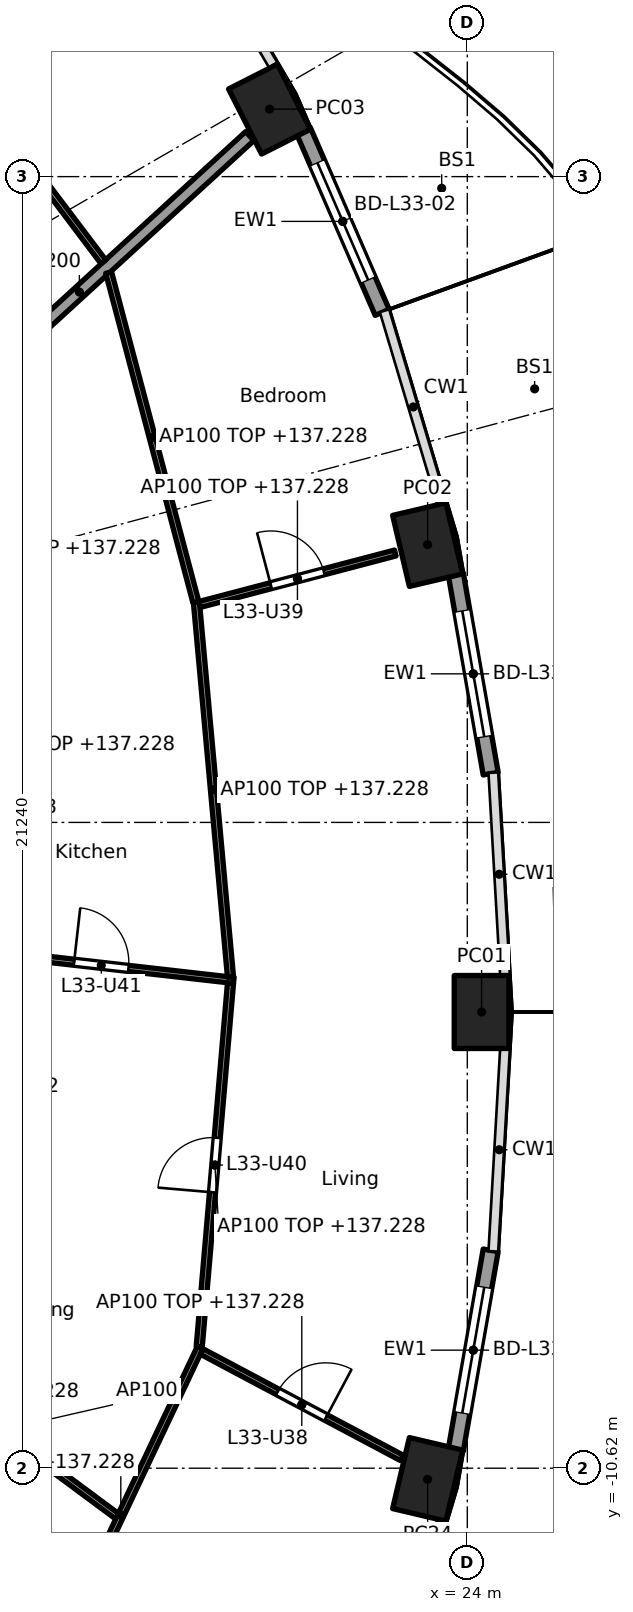
"""IFC4 building model, lengths in metres.
Left out: names, types, materials, properties, quantities, classifications, styles, units other than length and angle.
Written with IfcOpenShell. Run it as: python <this file> out.ifc"""

import sys

from ifc_helpers import new_model, si_unit, direction, frame, frame_2d, origin, origin_2d, place, context, subcontext, project, spatial, rectangle, hollow_rectangle, extrude, element, fill, save


model = new_model("IFC4")
c1 = context("Model", 3, precision=1e-05, world=origin(), true_north=direction((0.0, 1.0)))
c2 = subcontext(c1, "Body", "Model", "MODEL_VIEW")
j1 = project(units=[si_unit("LENGTHUNIT", "METRE"), si_unit("PLANEANGLEUNIT", "RADIAN")], contexts=[c1])
p1 = place(None, origin())
s1 = spatial("IfcSite", under=j1, at=p1, CompositionType="ELEMENT")
p2 = place(p1, origin())
s2 = spatial("IfcBuilding", under=s1, at=p2, CompositionType="ELEMENT")
p3 = place(p2, frame((0.0, 0.0, 134.4)))
s3 = spatial("IfcBuildingStorey", under=s2, at=p3, CompositionType="ELEMENT", Elevation=134.4)
for number, where, z_axis, x_axis in (
    (1, (24.235, -3.118, 0.0), (0.0, 0.0, 1.0), (0.0, 1.0, 0.0)),
    (2, (23.348, 4.568, 0.0), (0.0, 0.0, 1.0), (-0.229, 0.973, 0.0)),
    (3, (20.747, 11.73, 0.0), (0.0, 0.0, 1.0), (-0.452, 0.892, 0.0)),
    (4, (23.348, -10.803, 0.0), (0.0, 0.0, 1.0), (0.229, 0.973, 0.0)),
):
    element("IfcColumn", number, at=place(p3, frame(where, z_axis=z_axis, x_axis=x_axis)), inside=s3, PredefinedType="COLUMN", context=c2, shape_type="SweptSolid", body=[
        extrude(hollow_rectangle(XDim=1.2, YDim=0.9, WallThickness=0.04, at=origin_2d()), origin(), (0.0, 0.0, 1.0), 3.7),
    ])
p4 = place(p3, frame((23.811, 4.085, 0.0), z_axis=(0.0, 0.0, 1.0), x_axis=(0.172163521006, -0.985068384446, 0.0)))
e5 = element("IfcWall", 5, at=p4, inside=s3, PredefinedType="SOLIDWALL", context=c2, shape_type="SweptSolid", body=[
    extrude(rectangle(XDim=3.333, YDim=0.25, at=frame_2d((1.666, 0.0))), origin(), (0.0, 0.0, 1.0), 3.44),
])
p5 = place(p4, frame((0.616, 0.0, 0.0)))
e6 = element("IfcOpeningElement", 6, at=p5, cuts=e5, PredefinedType="OPENING", context=c2, shape_type="SweptSolid", body=[
    extrude(rectangle(XDim=2.1, YDim=2.4, at=frame_2d((1.05, 1.2))), frame((0.0, 0.135, 0.0), z_axis=(0.0, -1.0, 0.0), x_axis=(1.0, 0.0, 0.0)), (0.0, 0.0, 1.0), 0.27),
])
p6 = place(p3, frame((21.304, 11.38, 0.0), z_axis=(0.0, 0.0, 1.0), x_axis=(0.397575919276, -0.917569282622, 0.0)))
e7 = element("IfcWall", 7, at=p6, inside=s3, PredefinedType="SOLIDWALL", context=c2, shape_type="SweptSolid", body=[
    extrude(rectangle(XDim=3.261, YDim=0.25, at=frame_2d((1.63, 0.0))), origin(), (0.0, 0.0, 1.0), 3.44),
])
p7 = place(p6, frame((0.58, 0.0, 0.0)))
e8 = element("IfcOpeningElement", 8, at=p7, cuts=e7, PredefinedType="OPENING", context=c2, shape_type="SweptSolid", body=[
    extrude(rectangle(XDim=2.1, YDim=2.4, at=frame_2d((1.05, 1.2))), frame((0.0, 0.135, 0.0), z_axis=(0.0, -1.0, 0.0), x_axis=(1.0, 0.0, 0.0)), (0.0, 0.0, 1.0), 0.27),
])
p8 = place(p3, frame((24.385, -7.037, 0.0), z_axis=(0.0, 0.0, 1.0), x_axis=(-0.172163521006, -0.985068384446, 0.0)))
e9 = element("IfcWall", 9, at=p8, inside=s3, PredefinedType="SOLIDWALL", context=c2, shape_type="SweptSolid", body=[
    extrude(rectangle(XDim=3.333, YDim=0.25, at=frame_2d((1.666, 0.0))), origin(), (0.0, 0.0, 1.0), 3.44),
])
p9 = place(p8, frame((0.616, 0.0, 0.0)))
e10 = element("IfcOpeningElement", 10, at=p9, cuts=e9, PredefinedType="OPENING", context=c2, shape_type="SweptSolid", body=[
    extrude(rectangle(XDim=2.1, YDim=2.4, at=frame_2d((1.05, 1.2))), frame((0.0, 0.135, 0.0), z_axis=(0.0, -1.0, 0.0), x_axis=(1.0, 0.0, 0.0)), (0.0, 0.0, 1.0), 0.27),
])
p10 = place(p3, frame((14.819, 6.157, 0.0), z_axis=(0.0, 0.0, 1.0), x_axis=(0.737608883396, 0.675228209671, 0.0)))
e11 = element("IfcWall", 11, at=p10, inside=s3, PredefinedType="PARTITIONING", context=c2, shape_type="SweptSolid", body=[
    extrude(rectangle(XDim=7.596, YDim=0.2, at=frame_2d((3.798, 0.0))), origin(), (0.0, 0.0, 1.0), 3.44),
])
p11 = place(p3, frame((12.664, -1.746, 0.0), z_axis=(0.0, 0.0, 1.0), x_axis=(0.993605172276, -0.112910414164, 0.0)))
e12 = element("IfcWall", 12, at=p11, inside=s3, PredefinedType="PARTITIONING", context=c2, shape_type="SweptSolid", body=[
    extrude(rectangle(XDim=7.544, YDim=0.1, at=frame_2d((3.772, 0.0))), origin(), (0.0, 0.0, 1.0), 2.756),
])
p12 = place(p11, frame((4.901, 0.0, 0.0)))
e13 = element("IfcOpeningElement", 13, at=p12, cuts=e12, PredefinedType="OPENING", context=c2, shape_type="SweptSolid", body=[
    extrude(rectangle(XDim=0.9, YDim=2.1, at=frame_2d((0.45, 1.05))), frame((0.0, 0.06, 0.0), z_axis=(0.0, -1.0, 0.0), x_axis=(1.0, 0.0, 0.0)), (0.0, 0.0, 1.0), 0.12),
])
p13 = place(p3, frame((20.106, -2.542, 0.0), z_axis=(0.0, 0.0, 1.0), x_axis=(-0.090567755363, 0.995890296011, 0.0)))
e14 = element("IfcWall", 14, at=p13, inside=s3, PredefinedType="PARTITIONING", context=c2, shape_type="SweptSolid", body=[
    extrude(rectangle(XDim=6.189, YDim=0.1, at=frame_2d((3.095, 0.0))), origin(), (0.0, 0.0, 1.0), 2.828),
])
p14 = place(p3, frame((20.106, -2.642, 0.0), z_axis=(0.0, 0.0, 1.0), x_axis=(-0.085672025822, -0.996323393277, 0.0)))
e15 = element("IfcWall", 15, at=p14, inside=s3, PredefinedType="PARTITIONING", context=c2, shape_type="SweptSolid", body=[
    extrude(rectangle(XDim=6.007, YDim=0.1, at=frame_2d((3.003, 0.0))), origin(), (0.0, 0.0, 1.0), 2.828),
])
p15 = place(p14, frame((2.554, 0.0, 0.0)))
e16 = element("IfcOpeningElement", 16, at=p15, cuts=e15, PredefinedType="OPENING", context=c2, shape_type="SweptSolid", body=[
    extrude(rectangle(XDim=0.9, YDim=2.1, at=frame_2d((0.45, 1.05))), frame((0.0, 0.06, 0.0), z_axis=(0.0, -1.0, 0.0), x_axis=(1.0, 0.0, 0.0)), (0.0, 0.0, 1.0), 0.12),
])
p16 = place(p3, frame((19.598, 3.584, 0.0), z_axis=(0.0, 0.0, 1.0), x_axis=(0.967108750962, 0.254363251695, 0.0)))
e17 = element("IfcWall", 17, at=p16, inside=s3, PredefinedType="PARTITIONING", context=c2, shape_type="SweptSolid", body=[
    extrude(rectangle(XDim=3.327, YDim=0.1, at=frame_2d((1.663, 0.0))), origin(), (0.0, 0.0, 1.0), 2.828),
])
p17 = place(p16, frame((1.213, 0.0, 0.0)))
e18 = element("IfcOpeningElement", 18, at=p17, cuts=e17, PredefinedType="OPENING", context=c2, shape_type="SweptSolid", body=[
    extrude(rectangle(XDim=0.9, YDim=2.1, at=frame_2d((0.45, 1.05))), frame((0.0, 0.06, 0.0), z_axis=(0.0, -1.0, 0.0), x_axis=(1.0, 0.0, 0.0)), (0.0, 0.0, 1.0), 0.12),
])
p18 = place(p3, frame((19.537, 3.62, 0.0), z_axis=(0.0, 0.0, 1.0), x_axis=(-0.255909310473, 0.966700793841, 0.0)))
e19 = element("IfcWall", 19, at=p18, inside=s3, PredefinedType="PARTITIONING", context=c2, shape_type="SweptSolid", body=[
    extrude(rectangle(XDim=5.609, YDim=0.1, at=frame_2d((2.804, 0.0))), origin(), (0.0, 0.0, 1.0), 2.828),
])
p19 = place(p3, frame((18.016, 9.218, 0.0), z_axis=(0.0, 0.0, 1.0), x_axis=(-0.602411163107, 0.798185937338, 0.0)))
e20 = element("IfcWall", 20, at=p19, inside=s3, PredefinedType="PARTITIONING", context=c2, shape_type="SweptSolid", body=[
    extrude(rectangle(XDim=6.894, YDim=0.1, at=frame_2d((3.447, 0.0))), origin(), (0.0, 0.0, 1.0), 2.828),
])
p20 = place(p19, frame((2.972, 0.0, 0.0)))
e21 = element("IfcOpeningElement", 21, at=p20, cuts=e20, PredefinedType="OPENING", context=c2, shape_type="SweptSolid", body=[
    extrude(rectangle(XDim=0.9, YDim=2.1, at=frame_2d((0.45, 1.05))), frame((0.0, 0.06, 0.0), z_axis=(0.0, -1.0, 0.0), x_axis=(1.0, 0.0, 0.0)), (0.0, 0.0, 1.0), 0.12),
])
p21 = place(p3, frame((10.184, -7.727, 0.0), z_axis=(0.0, 0.0, 1.0), x_axis=(0.723635100101, -0.690182759783, 0.0)))
e22 = element("IfcWall", 22, at=p21, inside=s3, PredefinedType="PARTITIONING", context=c2, shape_type="SweptSolid", body=[
    extrude(rectangle(XDim=14.173, YDim=0.1, at=frame_2d((7.086, 0.0))), origin(), (0.0, 0.0, 1.0), 2.756),
])
p22 = place(p21, frame((1.565, 0.0, 0.0)))
e23 = element("IfcOpeningElement", 23, at=p22, cuts=e22, PredefinedType="OPENING", context=c2, shape_type="SweptSolid", body=[
    extrude(rectangle(XDim=0.9, YDim=2.1, at=frame_2d((0.45, 1.05))), frame((0.0, 0.06, 0.0), z_axis=(0.0, -1.0, 0.0), x_axis=(1.0, 0.0, 0.0)), (0.0, 0.0, 1.0), 0.12),
])
p23 = place(p21, frame((6.257, 0.0, 0.0)))
e24 = element("IfcOpeningElement", 24, at=p23, cuts=e22, PredefinedType="OPENING", context=c2, shape_type="SweptSolid", body=[
    extrude(rectangle(XDim=0.9, YDim=2.1, at=frame_2d((0.45, 1.05))), frame((0.0, 0.06, 0.0), z_axis=(0.0, -1.0, 0.0), x_axis=(1.0, 0.0, 0.0)), (0.0, 0.0, 1.0), 0.12),
])
p24 = place(p21, frame((11.328, 0.0, 0.0)))
e25 = element("IfcOpeningElement", 25, at=p24, cuts=e22, PredefinedType="OPENING", context=c2, shape_type="SweptSolid", body=[
    extrude(rectangle(XDim=0.9, YDim=2.1, at=frame_2d((0.45, 1.05))), frame((0.0, 0.06, 0.0), z_axis=(0.0, -1.0, 0.0), x_axis=(1.0, 0.0, 0.0)), (0.0, 0.0, 1.0), 0.12),
])
p25 = place(p3, frame((16.995, -14.158, 0.0), z_axis=(0.0, 0.0, 1.0), x_axis=(0.427456178439, 0.904036069808, 0.0)))
e26 = element("IfcWall", 26, at=p25, inside=s3, PredefinedType="PARTITIONING", context=c2, shape_type="SweptSolid", body=[
    extrude(rectangle(XDim=6.113, YDim=0.1, at=frame_2d((3.057, 0.0))), origin(), (0.0, 0.0, 1.0), 2.828),
])
p26 = place(p3, frame((14.429, -8.583, 0.0), z_axis=(0.0, 0.0, 1.0), x_axis=(0.803162355549, -0.595760212358, 0.0)))
e27 = element("IfcWall", 27, at=p26, inside=s3, PredefinedType="PARTITIONING", context=c2, shape_type="SweptSolid", body=[
    extrude(rectangle(XDim=4.745, YDim=0.1, at=frame_2d((2.373, 0.0))), origin(), (0.0, 0.0, 1.0), 3.44),
])
p27 = place(p3, frame((19.631, -8.7, 0.0), z_axis=(0.0, 0.0, 1.0), x_axis=(0.883011478612, -0.469351391433, 0.0)))
e28 = element("IfcWall", 28, at=p27, inside=s3, PredefinedType="PARTITIONING", context=c2, shape_type="SweptSolid", body=[
    extrude(rectangle(XDim=3.731, YDim=0.1, at=frame_2d((1.865, 0.0))), origin(), (0.0, 0.0, 1.0), 2.828),
])
p28 = place(p27, frame((1.415, 0.0, 0.0)))
e29 = element("IfcOpeningElement", 29, at=p28, cuts=e28, PredefinedType="OPENING", context=c2, shape_type="SweptSolid", body=[
    extrude(rectangle(XDim=0.9, YDim=2.1, at=frame_2d((0.45, 1.05))), frame((0.0, 0.06, 0.0), z_axis=(0.0, -1.0, 0.0), x_axis=(1.0, 0.0, 0.0)), (0.0, 0.0, 1.0), 0.12),
])
p29 = place(p5, origin())
e30 = element("IfcDoor", 30, at=p29, inside=s3, OperationType="SLIDING_TO_LEFT", PredefinedType="DOOR", context=c2, shape_type="SweptSolid", body=[
    extrude(rectangle(XDim=2.1, YDim=2.4, at=frame_2d((1.05, 1.2))), frame((0.0, 0.025, 0.0), z_axis=(0.0, -1.0, 0.0), x_axis=(1.0, 0.0, 0.0)), (0.0, 0.0, 1.0), 0.05),
])
fill(e6, e30)
p30 = place(p7, origin())
e31 = element("IfcDoor", 31, at=p30, inside=s3, OperationType="SLIDING_TO_LEFT", PredefinedType="DOOR", context=c2, shape_type="SweptSolid", body=[
    extrude(rectangle(XDim=2.1, YDim=2.4, at=frame_2d((1.05, 1.2))), frame((0.0, 0.025, 0.0), z_axis=(0.0, -1.0, 0.0), x_axis=(1.0, 0.0, 0.0)), (0.0, 0.0, 1.0), 0.05),
])
fill(e8, e31)
p31 = place(p9, origin())
e32 = element("IfcDoor", 32, at=p31, inside=s3, OperationType="SLIDING_TO_LEFT", PredefinedType="DOOR", context=c2, shape_type="SweptSolid", body=[
    extrude(rectangle(XDim=2.1, YDim=2.4, at=frame_2d((1.05, 1.2))), frame((0.0, 0.025, 0.0), z_axis=(0.0, -1.0, 0.0), x_axis=(1.0, 0.0, 0.0)), (0.0, 0.0, 1.0), 0.05),
])
fill(e10, e32)
p32 = place(p28, origin())
e33 = element("IfcDoor", 33, at=p32, inside=s3, OperationType="SINGLE_SWING_RIGHT", PredefinedType="DOOR", context=c2, shape_type="SweptSolid", body=[
    extrude(rectangle(XDim=0.9, YDim=2.1, at=frame_2d((0.45, 1.05))), frame((0.0, 0.025, 0.0), z_axis=(0.0, -1.0, 0.0), x_axis=(1.0, 0.0, 0.0)), (0.0, 0.0, 1.0), 0.05),
])
fill(e29, e33)
p33 = place(p17, origin())
e34 = element("IfcDoor", 34, at=p33, inside=s3, OperationType="SINGLE_SWING_LEFT", PredefinedType="DOOR", context=c2, shape_type="SweptSolid", body=[
    extrude(rectangle(XDim=0.9, YDim=2.1, at=frame_2d((0.45, 1.05))), frame((0.0, 0.025, 0.0), z_axis=(0.0, -1.0, 0.0), x_axis=(1.0, 0.0, 0.0)), (0.0, 0.0, 1.0), 0.05),
])
fill(e18, e34)
p34 = place(p15, frame((0.9, 0.0, 0.0), x_axis=(-1.0, 0.0, 0.0)))
e35 = element("IfcDoor", 35, at=p34, inside=s3, OperationType="SINGLE_SWING_LEFT", PredefinedType="DOOR", context=c2, shape_type="SweptSolid", body=[
    extrude(rectangle(XDim=0.9, YDim=2.1, at=frame_2d((0.45, 1.05))), frame((0.0, 0.025, 0.0), z_axis=(0.0, -1.0, 0.0), x_axis=(1.0, 0.0, 0.0)), (0.0, 0.0, 1.0), 0.05),
])
fill(e16, e35)
p35 = place(p12, origin())
e36 = element("IfcDoor", 36, at=p35, inside=s3, OperationType="SINGLE_SWING_LEFT", PredefinedType="DOOR", context=c2, shape_type="SweptSolid", body=[
    extrude(rectangle(XDim=0.9, YDim=2.1, at=frame_2d((0.45, 1.05))), frame((0.0, 0.025, 0.0), z_axis=(0.0, -1.0, 0.0), x_axis=(1.0, 0.0, 0.0)), (0.0, 0.0, 1.0), 0.05),
])
fill(e13, e36)
save(model, sys.argv[1])
